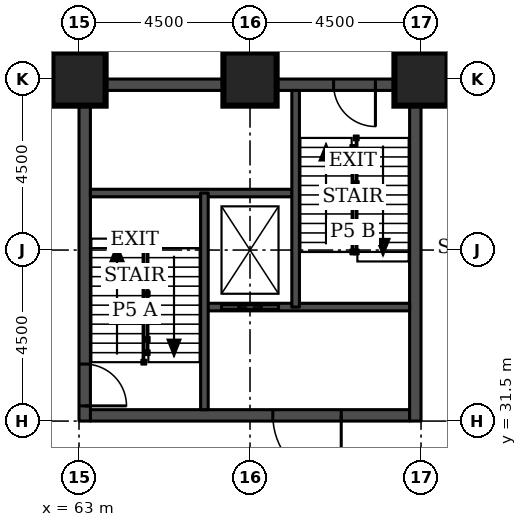
"""IFC4 building model, lengths in metres.
Left out: names, types, materials, properties, quantities, classifications, styles, units other than length and angle.
Written with IfcOpenShell. Run it as: python <this file> out.ifc"""

import sys

from ifc_helpers import new_model, si_unit, direction, frame, frame_2d, origin, origin_2d, place, context, subcontext, project, spatial, rectangle, extrude, element, fill, save


model = new_model("IFC4")
c1 = context("Model", 3, precision=1e-05, world=origin(), true_north=direction((0.0, 1.0)))
c2 = subcontext(c1, "Body", "Model", "MODEL_VIEW")
j1 = project(units=[si_unit("LENGTHUNIT", "METRE"), si_unit("PLANEANGLEUNIT", "RADIAN")], contexts=[c1])
p1 = place(None, origin())
s1 = spatial("IfcSite", under=j1, at=p1, CompositionType="ELEMENT")
p2 = place(p1, origin())
s2 = spatial("IfcBuilding", under=s1, at=p2, CompositionType="ELEMENT")
p3 = place(p2, frame((0.0, 0.0, -9.0)))
s3 = spatial("IfcBuildingStorey", under=s2, at=p3, CompositionType="ELEMENT", Elevation=-9.0)
for number, where, z_axis, x_axis in (
    (1, (63.0, 40.5, 0.0), (0.0, 0.0, 1.0), (1.0, 0.0, 0.0)),
    (2, (67.5, 40.5, 0.0), (0.0, 0.0, 1.0), (1.0, 0.0, 0.0)),
    (3, (72.0, 40.5, 0.0), (0.0, 0.0, 1.0), (1.0, 0.0, 0.0)),
):
    element("IfcColumn", number, at=place(p3, frame(where, z_axis=z_axis, x_axis=x_axis)), inside=s3, PredefinedType="COLUMN", context=c2, shape_type="SweptSolid", body=[
        extrude(rectangle(XDim=1.4, YDim=1.4, at=origin_2d()), origin(), (0.0, 0.0, 1.0), 4.5),
    ])
p4 = place(p3, frame((63.3, 31.65, 0.0), z_axis=(0.0, 0.0, 1.0), x_axis=(1.0, 0.0, 0.0)))
e4 = element("IfcWall", 4, at=p4, inside=s3, PredefinedType="SHEAR", context=c2, shape_type="SweptSolid", body=[
    extrude(rectangle(XDim=8.4, YDim=0.3, at=frame_2d((4.2, 0.0))), origin(), (0.0, 0.0, 1.0), 4.5),
])
p5 = place(p4, frame((4.8, 0.0, 0.0)))
e5 = element("IfcOpeningElement", 5, at=p5, cuts=e4, PredefinedType="OPENING", context=c2, shape_type="SweptSolid", body=[
    extrude(rectangle(XDim=1.8, YDim=2.1, at=frame_2d((0.9, 1.05))), frame((0.0, 0.16, 0.0), z_axis=(0.0, -1.0, 0.0), x_axis=(1.0, 0.0, 0.0)), (0.0, 0.0, 1.0), 0.32),
])
p6 = place(p3, frame((63.3, 40.35, 0.0), z_axis=(0.0, 0.0, 1.0), x_axis=(1.0, 0.0, 0.0)))
e6 = element("IfcWall", 6, at=p6, inside=s3, PredefinedType="SHEAR", context=c2, shape_type="SweptSolid", body=[
    extrude(rectangle(XDim=8.4, YDim=0.3, at=frame_2d((4.2, 0.0))), origin(), (0.0, 0.0, 1.0), 4.5),
])
p7 = place(p6, frame((6.4, 0.0, 0.0)))
e7 = element("IfcOpeningElement", 7, at=p7, cuts=e6, PredefinedType="OPENING", context=c2, shape_type="SweptSolid", body=[
    extrude(rectangle(XDim=1.1, YDim=2.1, at=frame_2d((0.55, 1.05))), frame((0.0, 0.16, 0.0), z_axis=(0.0, -1.0, 0.0), x_axis=(1.0, 0.0, 0.0)), (0.0, 0.0, 1.0), 0.32),
])
p8 = place(p3, frame((63.15, 31.5, 0.0), z_axis=(0.0, 0.0, 1.0), x_axis=(0.0, 1.0, 0.0)))
e8 = element("IfcWall", 8, at=p8, inside=s3, PredefinedType="SHEAR", context=c2, shape_type="SweptSolid", body=[
    extrude(rectangle(XDim=9.0, YDim=0.3, at=frame_2d((4.5, 0.0))), origin(), (0.0, 0.0, 1.0), 4.5),
])
p9 = place(p8, frame((0.4, 0.0, 0.0)))
e9 = element("IfcOpeningElement", 9, at=p9, cuts=e8, PredefinedType="OPENING", context=c2, shape_type="SweptSolid", body=[
    extrude(rectangle(XDim=1.1, YDim=2.1, at=frame_2d((0.55, 1.05))), frame((0.0, 0.16, 0.0), z_axis=(0.0, -1.0, 0.0), x_axis=(1.0, 0.0, 0.0)), (0.0, 0.0, 1.0), 0.32),
])
p10 = place(p3, frame((71.85, 31.5, 0.0), z_axis=(0.0, 0.0, 1.0), x_axis=(0.0, 1.0, 0.0)))
e10 = element("IfcWall", 10, at=p10, inside=s3, PredefinedType="SHEAR", context=c2, shape_type="SweptSolid", body=[
    extrude(rectangle(XDim=9.0, YDim=0.3, at=frame_2d((4.5, 0.0))), origin(), (0.0, 0.0, 1.0), 4.5),
])
p11 = place(p3, frame((66.3, 34.5, 0.0), z_axis=(0.0, 0.0, 1.0), x_axis=(1.0, 0.0, 0.0)))
e11 = element("IfcWall", 11, at=p11, inside=s3, PredefinedType="SOLIDWALL", context=c2, shape_type="SweptSolid", body=[
    extrude(rectangle(XDim=5.4, YDim=0.2, at=frame_2d((2.7, 0.0))), origin(), (0.0, 0.0, 1.0), 4.1),
])
p12 = place(p11, frame((0.45, 0.0, 0.0)))
e12 = element("IfcOpeningElement", 12, at=p12, cuts=e11, PredefinedType="OPENING", context=c2, shape_type="SweptSolid", body=[
    extrude(rectangle(XDim=1.5, YDim=2.1, at=frame_2d((0.75, 1.05))), frame((0.0, 0.11, 0.0), z_axis=(0.0, -1.0, 0.0), x_axis=(1.0, 0.0, 0.0)), (0.0, 0.0, 1.0), 0.22),
])
p13 = place(p3, frame((63.3, 37.5, 0.0), z_axis=(0.0, 0.0, 1.0), x_axis=(1.0, 0.0, 0.0)))
e13 = element("IfcWall", 13, at=p13, inside=s3, PredefinedType="SOLIDWALL", context=c2, shape_type="SweptSolid", body=[
    extrude(rectangle(XDim=5.4, YDim=0.2, at=frame_2d((2.7, 0.0))), origin(), (0.0, 0.0, 1.0), 4.1),
])
for number, where, z_axis, x_axis in (
    (14, (66.3, 31.8, 0.0), (0.0, 0.0, 1.0), (0.0, 1.0, 0.0)),
    (15, (68.7, 34.5, 0.0), (0.0, 0.0, 1.0), (0.0, 1.0, 0.0)),
):
    element("IfcWall", number, at=place(p3, frame(where, z_axis=z_axis, x_axis=x_axis)), inside=s3, PredefinedType="SOLIDWALL", context=c2, shape_type="SweptSolid", body=[
        extrude(rectangle(XDim=5.7, YDim=0.2, at=frame_2d((2.85, 0.0))), origin(), (0.0, 0.0, 1.0), 4.1),
    ])
p14 = place(p9, frame((1.1, 0.0, 0.0), z_axis=(0.0, 0.0, 1.0), x_axis=(-1.0, 0.0, 0.0)))
e16 = element("IfcDoor", 16, at=p14, inside=s3, OperationType="SINGLE_SWING_RIGHT", PredefinedType="DOOR", context=c2, shape_type="SweptSolid", body=[
    extrude(rectangle(XDim=1.1, YDim=2.1, at=frame_2d((0.55, 1.05))), frame((0.0, 0.025, 0.0), z_axis=(0.0, -1.0, 0.0), x_axis=(1.0, 0.0, 0.0)), (0.0, 0.0, 1.0), 0.05),
])
fill(e9, e16)
p15 = place(p7, frame((1.1, 0.0, 0.0), z_axis=(0.0, 0.0, 1.0), x_axis=(-1.0, 0.0, 0.0)))
e17 = element("IfcDoor", 17, at=p15, inside=s3, OperationType="SINGLE_SWING_LEFT", PredefinedType="DOOR", context=c2, shape_type="SweptSolid", body=[
    extrude(rectangle(XDim=1.1, YDim=2.1, at=frame_2d((0.55, 1.05))), frame((0.0, 0.025, 0.0), z_axis=(0.0, -1.0, 0.0), x_axis=(1.0, 0.0, 0.0)), (0.0, 0.0, 1.0), 0.05),
])
fill(e7, e17)
p16 = place(p12, origin())
e18 = element("IfcDoor", 18, at=p16, inside=s3, OperationType="DOUBLE_DOOR_SLIDING", PredefinedType="DOOR", context=c2, shape_type="SweptSolid", body=[
    extrude(rectangle(XDim=1.5, YDim=2.1, at=frame_2d((0.75, 1.05))), frame((0.0, 0.025, 0.0), z_axis=(0.0, -1.0, 0.0), x_axis=(1.0, 0.0, 0.0)), (0.0, 0.0, 1.0), 0.05),
])
fill(e12, e18)
p17 = place(p5, frame((1.8, 0.0, 0.0), z_axis=(0.0, 0.0, 1.0), x_axis=(-1.0, 0.0, 0.0)))
e19 = element("IfcDoor", 19, at=p17, inside=s3, OperationType="SINGLE_SWING_LEFT", PredefinedType="DOOR", context=c2, shape_type="SweptSolid", body=[
    extrude(rectangle(XDim=1.8, YDim=2.1, at=frame_2d((0.9, 1.05))), frame((0.0, 0.025, 0.0), z_axis=(0.0, -1.0, 0.0), x_axis=(1.0, 0.0, 0.0)), (0.0, 0.0, 1.0), 0.05),
])
fill(e5, e19)
save(model, sys.argv[1])
